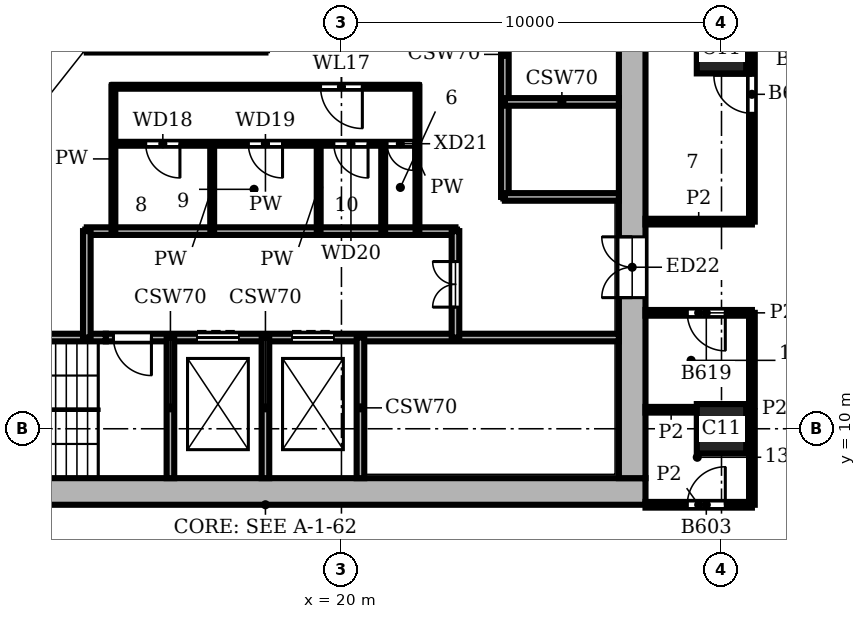
"""IFC4 building model, lengths in metres.
Left out: names, types, materials, properties, quantities, classifications, styles, units other than length and angle.
Written with IfcOpenShell. Run it as: python <this file> out.ifc"""

import sys

from ifc_helpers import new_model, si_unit, direction, frame, frame_2d, origin, origin_2d, place, context, subcontext, project, spatial, rectangle, extrude, element, fill, save


model = new_model("IFC4")
c1 = context("Model", 3, precision=1e-05, world=origin(), true_north=direction((0.0, 1.0)))
c2 = subcontext(c1, "Body", "Model", "MODEL_VIEW")
j1 = project(units=[si_unit("LENGTHUNIT", "METRE"), si_unit("PLANEANGLEUNIT", "RADIAN")], contexts=[c1])
p1 = place(None, origin())
s1 = spatial("IfcSite", under=j1, at=p1, CompositionType="ELEMENT")
p2 = place(p1, origin())
s2 = spatial("IfcBuilding", under=s1, at=p2, CompositionType="ELEMENT")
p3 = place(p2, frame((0.0, 0.0, 190.2)))
s3 = spatial("IfcBuildingStorey", under=s2, at=p3, CompositionType="ELEMENT", Elevation=190.2)
for number, where, z_axis, x_axis in (
    (1, (30.0, 10.0, 0.0), (0.0, 0.0, 1.0), (1.0, 0.0, 0.0)),
    (2, (30.0, 20.0, 0.0), (0.0, 0.0, 1.0), (1.0, 0.0, 0.0)),
):
    element("IfcColumn", number, at=place(p3, frame(where, z_axis=z_axis, x_axis=x_axis)), inside=s3, PredefinedType="COLUMN", context=c2, shape_type="SweptSolid", body=[
        extrude(rectangle(XDim=1.3, YDim=1.3, at=origin_2d()), origin(), (0.0, 0.0, 1.0), 3.9),
    ])
p4 = place(p3, frame((8.0, 8.35, 0.0), z_axis=(0.0, 0.0, 1.0), x_axis=(1.0, 0.0, 0.0)))
e3 = element("IfcWall", 3, at=p4, inside=s3, PredefinedType="SHEAR", context=c2, shape_type="SweptSolid", body=[
    extrude(rectangle(XDim=20.0, YDim=0.7, at=frame_2d((10.0, 0.0))), origin(), (0.0, 0.0, 1.0), 3.9),
])
p5 = place(p3, frame((27.65, 8.7, 0.0), z_axis=(0.0, 0.0, 1.0), x_axis=(0.0, 1.0, 0.0)))
e4 = element("IfcWall", 4, at=p5, inside=s3, PredefinedType="SHEAR", context=c2, shape_type="SweptSolid", body=[
    extrude(rectangle(XDim=18.6, YDim=0.7, at=frame_2d((9.3, 0.0))), origin(), (0.0, 0.0, 1.0), 3.9),
])
p6 = place(p5, frame((4.75, 0.0, 0.0)))
e5 = element("IfcOpeningElement", 5, at=p6, cuts=e4, PredefinedType="OPENING", context=c2, shape_type="SweptSolid", body=[
    extrude(rectangle(XDim=1.6, YDim=2.1, at=frame_2d((0.8, 1.05))), frame((0.0, 0.36, 0.0), z_axis=(0.0, -1.0, 0.0), x_axis=(1.0, 0.0, 0.0)), (0.0, 0.0, 1.0), 0.72),
])
p7 = place(p3, frame((8.7, 12.4, 0.0), z_axis=(0.0, 0.0, 1.0), x_axis=(1.0, 0.0, 0.0)))
e6 = element("IfcWall", 6, at=p7, inside=s3, PredefinedType="SHEAR", context=c2, shape_type="SweptSolid", body=[
    extrude(rectangle(XDim=5.1, YDim=0.2, at=frame_2d((2.55, 0.0))), origin(), (0.0, 0.0, 1.0), 3.58),
])
p8 = place(p3, frame((13.8, 12.4, 0.0), z_axis=(0.0, 0.0, 1.0), x_axis=(1.0, 0.0, 0.0)))
e7 = element("IfcWall", 7, at=p8, inside=s3, PredefinedType="SHEAR", context=c2, shape_type="SweptSolid", body=[
    extrude(rectangle(XDim=13.5, YDim=0.2, at=frame_2d((6.75, 0.0))), origin(), (0.0, 0.0, 1.0), 3.58),
])
p9 = place(p8, frame((2.4, 0.0, 0.0)))
e8 = element("IfcOpeningElement", 8, at=p9, cuts=e7, PredefinedType="OPENING", context=c2, shape_type="SweptSolid", body=[
    extrude(rectangle(XDim=1.1, YDim=2.1, at=frame_2d((0.55, 1.05))), frame((0.0, 0.11, 0.0), z_axis=(0.0, -1.0, 0.0), x_axis=(1.0, 0.0, 0.0)), (0.0, 0.0, 1.0), 0.22),
])
p10 = place(p8, frame((4.9, 0.0, 0.0)))
e9 = element("IfcOpeningElement", 9, at=p10, cuts=e7, PredefinedType="OPENING", context=c2, shape_type="SweptSolid", body=[
    extrude(rectangle(XDim=1.1, YDim=2.1, at=frame_2d((0.55, 1.05))), frame((0.0, 0.11, 0.0), z_axis=(0.0, -1.0, 0.0), x_axis=(1.0, 0.0, 0.0)), (0.0, 0.0, 1.0), 0.22),
])
p11 = place(p8, frame((0.2, 0.0, 0.0)))
e10 = element("IfcOpeningElement", 10, at=p11, cuts=e7, PredefinedType="OPENING", context=c2, shape_type="SweptSolid", body=[
    extrude(rectangle(XDim=1.0, YDim=2.1, at=frame_2d((0.5, 1.05))), frame((0.0, 0.11, 0.0), z_axis=(0.0, -1.0, 0.0), x_axis=(1.0, 0.0, 0.0)), (0.0, 0.0, 1.0), 0.22),
])
p12 = place(p3, frame((13.3, 15.2, 0.0), z_axis=(0.0, 0.0, 1.0), x_axis=(1.0, 0.0, 0.0)))
e11 = element("IfcWall", 11, at=p12, inside=s3, PredefinedType="SHEAR", context=c2, shape_type="SweptSolid", body=[
    extrude(rectangle(XDim=9.7, YDim=0.2, at=frame_2d((4.85, 0.0))), origin(), (0.0, 0.0, 1.0), 3.58),
])
p13 = place(p3, frame((24.3, 16.1, 0.0), z_axis=(0.0, 0.0, 1.0), x_axis=(1.0, 0.0, 0.0)))
e12 = element("IfcWall", 12, at=p13, inside=s3, PredefinedType="SHEAR", context=c2, shape_type="SweptSolid", body=[
    extrude(rectangle(XDim=3.0, YDim=0.2, at=frame_2d((1.5, 0.0))), origin(), (0.0, 0.0, 1.0), 3.58),
])
p14 = place(p3, frame((14.0, 17.5, 0.0), z_axis=(0.0, 0.0, 1.0), x_axis=(1.0, 0.0, 0.0)))
e13 = element("IfcWall", 13, at=p14, inside=s3, PredefinedType="PARTITIONING", context=c2, shape_type="SweptSolid", body=[
    extrude(rectangle(XDim=8.0, YDim=0.1, at=frame_2d((4.0, 0.0))), origin(), (0.0, 0.0, 1.0), 3.58),
])
p15 = place(p14, frame((0.85, 0.0, 0.0)))
e14 = element("IfcOpeningElement", 14, at=p15, cuts=e13, PredefinedType="OPENING", context=c2, shape_type="SweptSolid", body=[
    extrude(rectangle(XDim=0.9, YDim=2.1, at=frame_2d((0.45, 1.05))), frame((0.0, 0.06, 0.0), z_axis=(0.0, -1.0, 0.0), x_axis=(1.0, 0.0, 0.0)), (0.0, 0.0, 1.0), 0.12),
])
p16 = place(p14, frame((3.55, 0.0, 0.0)))
e15 = element("IfcOpeningElement", 15, at=p16, cuts=e13, PredefinedType="OPENING", context=c2, shape_type="SweptSolid", body=[
    extrude(rectangle(XDim=0.9, YDim=2.1, at=frame_2d((0.45, 1.05))), frame((0.0, 0.06, 0.0), z_axis=(0.0, -1.0, 0.0), x_axis=(1.0, 0.0, 0.0)), (0.0, 0.0, 1.0), 0.12),
])
p17 = place(p14, frame((5.8, 0.0, 0.0)))
e16 = element("IfcOpeningElement", 16, at=p17, cuts=e13, PredefinedType="OPENING", context=c2, shape_type="SweptSolid", body=[
    extrude(rectangle(XDim=0.9, YDim=2.1, at=frame_2d((0.45, 1.05))), frame((0.0, 0.06, 0.0), z_axis=(0.0, -1.0, 0.0), x_axis=(1.0, 0.0, 0.0)), (0.0, 0.0, 1.0), 0.12),
])
p18 = place(p14, frame((7.2, 0.0, 0.0)))
e17 = element("IfcOpeningElement", 17, at=p18, cuts=e13, PredefinedType="OPENING", context=c2, shape_type="SweptSolid", body=[
    extrude(rectangle(XDim=0.7, YDim=2.1, at=frame_2d((0.35, 1.05))), frame((0.0, 0.06, 0.0), z_axis=(0.0, -1.0, 0.0), x_axis=(1.0, 0.0, 0.0)), (0.0, 0.0, 1.0), 0.12),
])
p19 = place(p3, frame((24.3, 18.6, 0.0), z_axis=(0.0, 0.0, 1.0), x_axis=(1.0, 0.0, 0.0)))
e18 = element("IfcWall", 18, at=p19, inside=s3, PredefinedType="SHEAR", context=c2, shape_type="SweptSolid", body=[
    extrude(rectangle(XDim=3.0, YDim=0.2, at=frame_2d((1.5, 0.0))), origin(), (0.0, 0.0, 1.0), 3.58),
])
p20 = place(p3, frame((14.0, 19.0, 0.0), z_axis=(0.0, 0.0, 1.0), x_axis=(1.0, 0.0, 0.0)))
e19 = element("IfcWall", 19, at=p20, inside=s3, PredefinedType="PARTITIONING", context=c2, shape_type="SweptSolid", body=[
    extrude(rectangle(XDim=8.0, YDim=0.1, at=frame_2d((4.0, 0.0))), origin(), (0.0, 0.0, 1.0), 3.58),
])
p21 = place(p20, frame((5.45, 0.0, 0.0)))
e20 = element("IfcOpeningElement", 20, at=p21, cuts=e19, PredefinedType="OPENING", context=c2, shape_type="SweptSolid", body=[
    extrude(rectangle(XDim=1.1, YDim=2.1, at=frame_2d((0.55, 1.05))), frame((0.0, 0.06, 0.0), z_axis=(0.0, -1.0, 0.0), x_axis=(1.0, 0.0, 0.0)), (0.0, 0.0, 1.0), 0.12),
])
p22 = place(p3, frame((13.3, 12.4, 0.0), z_axis=(0.0, 0.0, 1.0), x_axis=(0.0, 1.0, 0.0)))
e21 = element("IfcWall", 21, at=p22, inside=s3, PredefinedType="SHEAR", context=c2, shape_type="SweptSolid", body=[
    extrude(rectangle(XDim=2.8, YDim=0.2, at=frame_2d((1.4, 0.0))), origin(), (0.0, 0.0, 1.0), 3.58),
])
p23 = place(p3, frame((14.0, 15.2, 0.0), z_axis=(0.0, 0.0, 1.0), x_axis=(0.0, 1.0, 0.0)))
e22 = element("IfcWall", 22, at=p23, inside=s3, PredefinedType="PARTITIONING", context=c2, shape_type="SweptSolid", body=[
    extrude(rectangle(XDim=3.8, YDim=0.1, at=frame_2d((1.9, 0.0))), origin(), (0.0, 0.0, 1.0), 3.58),
])
p24 = place(p3, frame((15.5, 8.7, 0.0), z_axis=(0.0, 0.0, 1.0), x_axis=(0.0, 1.0, 0.0)))
e23 = element("IfcWall", 23, at=p24, inside=s3, PredefinedType="SHEAR", context=c2, shape_type="SweptSolid", body=[
    extrude(rectangle(XDim=3.7, YDim=0.2, at=frame_2d((1.85, 0.0))), origin(), (0.0, 0.0, 1.0), 3.58),
])
p25 = place(p3, frame((16.6, 15.2, 0.0), z_axis=(0.0, 0.0, 1.0), x_axis=(0.0, 1.0, 0.0)))
e24 = element("IfcWall", 24, at=p25, inside=s3, PredefinedType="PARTITIONING", context=c2, shape_type="SweptSolid", body=[
    extrude(rectangle(XDim=2.3, YDim=0.1, at=frame_2d((1.15, 0.0))), origin(), (0.0, 0.0, 1.0), 3.58),
])
p26 = place(p3, frame((18.0, 8.7, 0.0), z_axis=(0.0, 0.0, 1.0), x_axis=(0.0, 1.0, 0.0)))
e25 = element("IfcWall", 25, at=p26, inside=s3, PredefinedType="SHEAR", context=c2, shape_type="SweptSolid", body=[
    extrude(rectangle(XDim=3.7, YDim=0.2, at=frame_2d((1.85, 0.0))), origin(), (0.0, 0.0, 1.0), 3.58),
])
p27 = place(p3, frame((19.4, 15.2, 0.0), z_axis=(0.0, 0.0, 1.0), x_axis=(0.0, 1.0, 0.0)))
e26 = element("IfcWall", 26, at=p27, inside=s3, PredefinedType="PARTITIONING", context=c2, shape_type="SweptSolid", body=[
    extrude(rectangle(XDim=2.3, YDim=0.1, at=frame_2d((1.15, 0.0))), origin(), (0.0, 0.0, 1.0), 3.58),
])
p28 = place(p3, frame((20.5, 8.7, 0.0), z_axis=(0.0, 0.0, 1.0), x_axis=(0.0, 1.0, 0.0)))
e27 = element("IfcWall", 27, at=p28, inside=s3, PredefinedType="SHEAR", context=c2, shape_type="SweptSolid", body=[
    extrude(rectangle(XDim=3.7, YDim=0.2, at=frame_2d((1.85, 0.0))), origin(), (0.0, 0.0, 1.0), 3.58),
])
p29 = place(p3, frame((21.1, 15.2, 0.0), z_axis=(0.0, 0.0, 1.0), x_axis=(0.0, 1.0, 0.0)))
e28 = element("IfcWall", 28, at=p29, inside=s3, PredefinedType="PARTITIONING", context=c2, shape_type="SweptSolid", body=[
    extrude(rectangle(XDim=2.3, YDim=0.1, at=frame_2d((1.15, 0.0))), origin(), (0.0, 0.0, 1.0), 3.58),
])
p30 = place(p3, frame((22.0, 15.2, 0.0), z_axis=(0.0, 0.0, 1.0), x_axis=(0.0, 1.0, 0.0)))
e29 = element("IfcWall", 29, at=p30, inside=s3, PredefinedType="PARTITIONING", context=c2, shape_type="SweptSolid", body=[
    extrude(rectangle(XDim=3.8, YDim=0.1, at=frame_2d((1.9, 0.0))), origin(), (0.0, 0.0, 1.0), 3.58),
])
p31 = place(p3, frame((23.0, 12.4, 0.0), z_axis=(0.0, 0.0, 1.0), x_axis=(0.0, 1.0, 0.0)))
e30 = element("IfcWall", 30, at=p31, inside=s3, PredefinedType="SHEAR", context=c2, shape_type="SweptSolid", body=[
    extrude(rectangle(XDim=2.8, YDim=0.2, at=frame_2d((1.4, 0.0))), origin(), (0.0, 0.0, 1.0), 3.58),
])
p32 = place(p31, frame((0.8, 0.0, 0.0)))
e31 = element("IfcOpeningElement", 31, at=p32, cuts=e30, PredefinedType="OPENING", context=c2, shape_type="SweptSolid", body=[
    extrude(rectangle(XDim=1.2, YDim=2.1, at=frame_2d((0.6, 1.05))), frame((0.0, 0.11, 0.0), z_axis=(0.0, -1.0, 0.0), x_axis=(1.0, 0.0, 0.0)), (0.0, 0.0, 1.0), 0.22),
])
p33 = place(p3, frame((24.3, 16.1, 0.0), z_axis=(0.0, 0.0, 1.0), x_axis=(0.0, 1.0, 0.0)))
e32 = element("IfcWall", 32, at=p33, inside=s3, PredefinedType="SHEAR", context=c2, shape_type="SweptSolid", body=[
    extrude(rectangle(XDim=7.5, YDim=0.2, at=frame_2d((3.75, 0.0))), origin(), (0.0, 0.0, 1.0), 3.58),
])
p34 = place(p33, frame((5.7, 0.0, 0.0)))
e33 = element("IfcOpeningElement", 33, at=p34, cuts=e32, PredefinedType="OPENING", context=c2, shape_type="SweptSolid", body=[
    extrude(rectangle(XDim=1.1, YDim=2.1, at=frame_2d((0.55, 1.05))), frame((0.0, 0.11, 0.0), z_axis=(0.0, -1.0, 0.0), x_axis=(1.0, 0.0, 0.0)), (0.0, 0.0, 1.0), 0.22),
])
p35 = place(p3, frame((30.8, 8.0, 0.0), z_axis=(0.0, 0.0, 1.0), x_axis=(0.0, 1.0, 0.0)))
e34 = element("IfcWall", 34, at=p35, inside=s3, PredefinedType="PARTITIONING", context=c2, shape_type="SweptSolid", body=[
    extrude(rectangle(XDim=5.05, YDim=0.15, at=frame_2d((2.525, 0.0))), origin(), (0.0, 0.0, 1.0), 3.58),
])
p36 = place(p3, frame((30.8, 15.45, 0.0), z_axis=(0.0, 0.0, 1.0), x_axis=(0.0, 1.0, 0.0)))
e35 = element("IfcWall", 35, at=p36, inside=s3, PredefinedType="PARTITIONING", context=c2, shape_type="SweptSolid", body=[
    extrude(rectangle(XDim=10.55, YDim=0.15, at=frame_2d((5.275, 0.0))), origin(), (0.0, 0.0, 1.0), 3.58),
])
p37 = place(p36, frame((2.85, 0.0, 0.0)))
e36 = element("IfcOpeningElement", 36, at=p37, cuts=e35, PredefinedType="OPENING", context=c2, shape_type="SweptSolid", body=[
    extrude(rectangle(XDim=1.0, YDim=2.1, at=frame_2d((0.5, 1.05))), frame((0.0, 0.085, 0.0), z_axis=(0.0, -1.0, 0.0), x_axis=(1.0, 0.0, 0.0)), (0.0, 0.0, 1.0), 0.17),
])
p38 = place(p3, frame((28.0, 8.0, 0.0), z_axis=(0.0, 0.0, 1.0), x_axis=(1.0, 0.0, 0.0)))
e37 = element("IfcWall", 37, at=p38, inside=s3, PredefinedType="PARTITIONING", context=c2, shape_type="SweptSolid", body=[
    extrude(rectangle(XDim=2.8, YDim=0.15, at=frame_2d((1.4, 0.0))), origin(), (0.0, 0.0, 1.0), 3.58),
])
p39 = place(p38, frame((1.1, 0.0, 0.0)))
e38 = element("IfcOpeningElement", 38, at=p39, cuts=e37, PredefinedType="OPENING", context=c2, shape_type="SweptSolid", body=[
    extrude(rectangle(XDim=1.0, YDim=2.1, at=frame_2d((0.5, 1.05))), frame((0.0, 0.085, 0.0), z_axis=(0.0, -1.0, 0.0), x_axis=(1.0, 0.0, 0.0)), (0.0, 0.0, 1.0), 0.17),
])
p40 = place(p3, frame((28.0, 10.5, 0.0), z_axis=(0.0, 0.0, 1.0), x_axis=(1.0, 0.0, 0.0)))
e39 = element("IfcWall", 39, at=p40, inside=s3, PredefinedType="PARTITIONING", context=c2, shape_type="SweptSolid", body=[
    extrude(rectangle(XDim=1.35, YDim=0.15, at=frame_2d((0.675, 0.0))), origin(), (0.0, 0.0, 1.0), 3.58),
])
p41 = place(p3, frame((28.0, 13.05, 0.0), z_axis=(0.0, 0.0, 1.0), x_axis=(1.0, 0.0, 0.0)))
e40 = element("IfcWall", 40, at=p41, inside=s3, PredefinedType="PARTITIONING", context=c2, shape_type="SweptSolid", body=[
    extrude(rectangle(XDim=2.8, YDim=0.15, at=frame_2d((1.4, 0.0))), origin(), (0.0, 0.0, 1.0), 3.58),
])
p42 = place(p41, frame((1.1, 0.0, 0.0)))
e41 = element("IfcOpeningElement", 41, at=p42, cuts=e40, PredefinedType="OPENING", context=c2, shape_type="SweptSolid", body=[
    extrude(rectangle(XDim=1.0, YDim=2.1, at=frame_2d((0.5, 1.05))), frame((0.0, 0.085, 0.0), z_axis=(0.0, -1.0, 0.0), x_axis=(1.0, 0.0, 0.0)), (0.0, 0.0, 1.0), 0.17),
])
p43 = place(p3, frame((28.0, 15.45, 0.0), z_axis=(0.0, 0.0, 1.0), x_axis=(1.0, 0.0, 0.0)))
e42 = element("IfcWall", 42, at=p43, inside=s3, PredefinedType="PARTITIONING", context=c2, shape_type="SweptSolid", body=[
    extrude(rectangle(XDim=2.8, YDim=0.15, at=frame_2d((1.4, 0.0))), origin(), (0.0, 0.0, 1.0), 3.58),
])
p44 = place(p9, origin())
e43 = element("IfcDoor", 43, at=p44, inside=s3, OperationType="DOUBLE_DOOR_SLIDING", PredefinedType="DOOR", context=c2, shape_type="SweptSolid", body=[
    extrude(rectangle(XDim=1.1, YDim=2.1, at=frame_2d((0.55, 1.05))), frame((0.0, 0.025, 0.0), z_axis=(0.0, -1.0, 0.0), x_axis=(1.0, 0.0, 0.0)), (0.0, 0.0, 1.0), 0.05),
])
fill(e8, e43)
p45 = place(p10, origin())
e44 = element("IfcDoor", 44, at=p45, inside=s3, OperationType="DOUBLE_DOOR_SLIDING", PredefinedType="DOOR", context=c2, shape_type="SweptSolid", body=[
    extrude(rectangle(XDim=1.1, YDim=2.1, at=frame_2d((0.55, 1.05))), frame((0.0, 0.025, 0.0), z_axis=(0.0, -1.0, 0.0), x_axis=(1.0, 0.0, 0.0)), (0.0, 0.0, 1.0), 0.05),
])
fill(e9, e44)
p46 = place(p11, frame((1.0, 0.0, 0.0), z_axis=(0.0, 0.0, 1.0), x_axis=(-1.0, 0.0, 0.0)))
e45 = element("IfcDoor", 45, at=p46, inside=s3, OperationType="SINGLE_SWING_LEFT", PredefinedType="DOOR", context=c2, shape_type="SweptSolid", body=[
    extrude(rectangle(XDim=1.0, YDim=2.1, at=frame_2d((0.5, 1.05))), frame((0.0, 0.025, 0.0), z_axis=(0.0, -1.0, 0.0), x_axis=(1.0, 0.0, 0.0)), (0.0, 0.0, 1.0), 0.05),
])
fill(e10, e45)
p47 = place(p32, origin())
e46 = element("IfcDoor", 46, at=p47, inside=s3, OperationType="DOUBLE_DOOR_SINGLE_SWING", PredefinedType="DOOR", context=c2, shape_type="SweptSolid", body=[
    extrude(rectangle(XDim=1.2, YDim=2.1, at=frame_2d((0.6, 1.05))), frame((0.0, 0.025, 0.0), z_axis=(0.0, -1.0, 0.0), x_axis=(1.0, 0.0, 0.0)), (0.0, 0.0, 1.0), 0.05),
])
fill(e31, e46)
p48 = place(p21, frame((1.1, 0.0, 0.0), z_axis=(0.0, 0.0, 1.0), x_axis=(-1.0, 0.0, 0.0)))
e47 = element("IfcDoor", 47, at=p48, inside=s3, OperationType="SINGLE_SWING_LEFT", PredefinedType="DOOR", context=c2, shape_type="SweptSolid", body=[
    extrude(rectangle(XDim=1.1, YDim=2.1, at=frame_2d((0.55, 1.05))), frame((0.0, 0.025, 0.0), z_axis=(0.0, -1.0, 0.0), x_axis=(1.0, 0.0, 0.0)), (0.0, 0.0, 1.0), 0.05),
])
fill(e20, e47)
p49 = place(p15, frame((0.9, 0.0, 0.0), z_axis=(0.0, 0.0, 1.0), x_axis=(-1.0, 0.0, 0.0)))
e48 = element("IfcDoor", 48, at=p49, inside=s3, OperationType="SINGLE_SWING_LEFT", PredefinedType="DOOR", context=c2, shape_type="SweptSolid", body=[
    extrude(rectangle(XDim=0.9, YDim=2.1, at=frame_2d((0.45, 1.05))), frame((0.0, 0.025, 0.0), z_axis=(0.0, -1.0, 0.0), x_axis=(1.0, 0.0, 0.0)), (0.0, 0.0, 1.0), 0.05),
])
fill(e14, e48)
p50 = place(p16, frame((0.9, 0.0, 0.0), z_axis=(0.0, 0.0, 1.0), x_axis=(-1.0, 0.0, 0.0)))
e49 = element("IfcDoor", 49, at=p50, inside=s3, OperationType="SINGLE_SWING_LEFT", PredefinedType="DOOR", context=c2, shape_type="SweptSolid", body=[
    extrude(rectangle(XDim=0.9, YDim=2.1, at=frame_2d((0.45, 1.05))), frame((0.0, 0.025, 0.0), z_axis=(0.0, -1.0, 0.0), x_axis=(1.0, 0.0, 0.0)), (0.0, 0.0, 1.0), 0.05),
])
fill(e15, e49)
p51 = place(p17, frame((0.9, 0.0, 0.0), z_axis=(0.0, 0.0, 1.0), x_axis=(-1.0, 0.0, 0.0)))
e50 = element("IfcDoor", 50, at=p51, inside=s3, OperationType="SINGLE_SWING_LEFT", PredefinedType="DOOR", context=c2, shape_type="SweptSolid", body=[
    extrude(rectangle(XDim=0.9, YDim=2.1, at=frame_2d((0.45, 1.05))), frame((0.0, 0.025, 0.0), z_axis=(0.0, -1.0, 0.0), x_axis=(1.0, 0.0, 0.0)), (0.0, 0.0, 1.0), 0.05),
])
fill(e16, e50)
p52 = place(p18, frame((0.7, 0.0, 0.0), z_axis=(0.0, 0.0, 1.0), x_axis=(-1.0, 0.0, 0.0)))
e51 = element("IfcDoor", 51, at=p52, inside=s3, OperationType="SINGLE_SWING_LEFT", PredefinedType="DOOR", context=c2, shape_type="SweptSolid", body=[
    extrude(rectangle(XDim=0.7, YDim=2.1, at=frame_2d((0.35, 1.05))), frame((0.0, 0.025, 0.0), z_axis=(0.0, -1.0, 0.0), x_axis=(1.0, 0.0, 0.0)), (0.0, 0.0, 1.0), 0.05),
])
fill(e17, e51)
p53 = place(p6, origin())
e52 = element("IfcDoor", 52, at=p53, inside=s3, OperationType="DOUBLE_DOOR_SINGLE_SWING", PredefinedType="DOOR", context=c2, shape_type="SweptSolid", body=[
    extrude(rectangle(XDim=1.6, YDim=2.1, at=frame_2d((0.8, 1.05))), frame((0.0, 0.025, 0.0), z_axis=(0.0, -1.0, 0.0), x_axis=(1.0, 0.0, 0.0)), (0.0, 0.0, 1.0), 0.05),
])
fill(e5, e52)
p54 = place(p39, origin())
e53 = element("IfcDoor", 53, at=p54, inside=s3, OperationType="SINGLE_SWING_RIGHT", PredefinedType="DOOR", context=c2, shape_type="SweptSolid", body=[
    extrude(rectangle(XDim=1.0, YDim=2.1, at=frame_2d((0.5, 1.05))), frame((0.0, 0.025, 0.0), z_axis=(0.0, -1.0, 0.0), x_axis=(1.0, 0.0, 0.0)), (0.0, 0.0, 1.0), 0.05),
])
fill(e38, e53)
p55 = place(p37, origin())
e54 = element("IfcDoor", 54, at=p55, inside=s3, OperationType="SINGLE_SWING_RIGHT", PredefinedType="DOOR", context=c2, shape_type="SweptSolid", body=[
    extrude(rectangle(XDim=1.0, YDim=2.1, at=frame_2d((0.5, 1.05))), frame((0.0, 0.025, 0.0), z_axis=(0.0, -1.0, 0.0), x_axis=(1.0, 0.0, 0.0)), (0.0, 0.0, 1.0), 0.05),
])
fill(e36, e54)
p56 = place(p42, frame((1.0, 0.0, 0.0), z_axis=(0.0, 0.0, 1.0), x_axis=(-1.0, 0.0, 0.0)))
e55 = element("IfcDoor", 55, at=p56, inside=s3, OperationType="SINGLE_SWING_LEFT", PredefinedType="DOOR", context=c2, shape_type="SweptSolid", body=[
    extrude(rectangle(XDim=1.0, YDim=2.1, at=frame_2d((0.5, 1.05))), frame((0.0, 0.025, 0.0), z_axis=(0.0, -1.0, 0.0), x_axis=(1.0, 0.0, 0.0)), (0.0, 0.0, 1.0), 0.05),
])
fill(e41, e55)
save(model, sys.argv[1])
